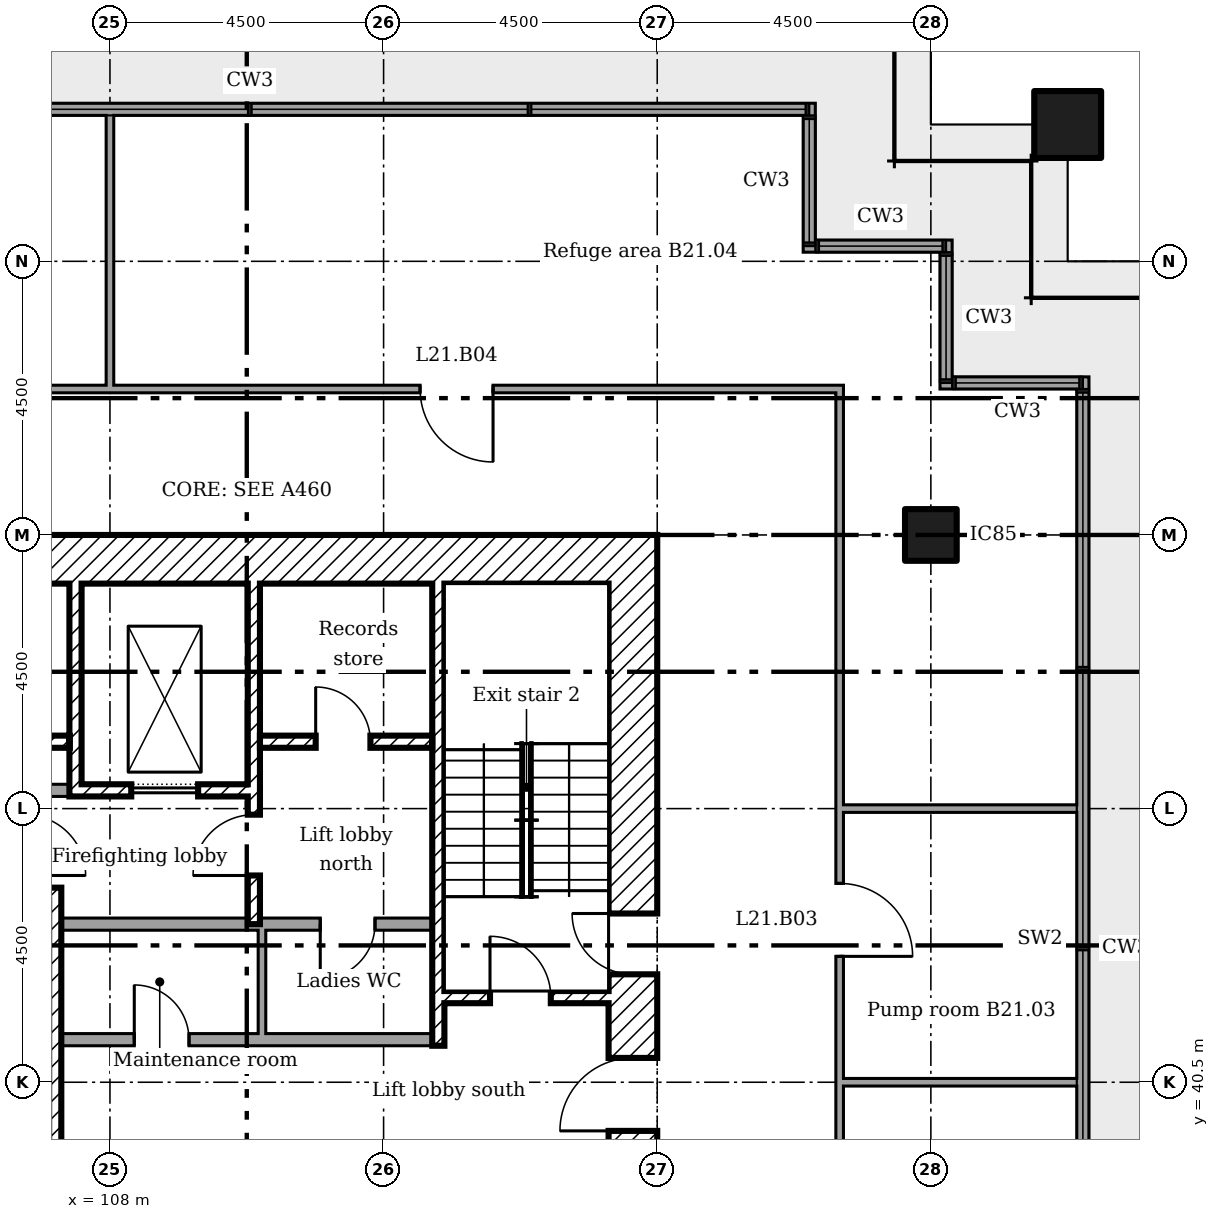
"""IFC4 building model, lengths in metres.
Left out: names, types, materials, properties, quantities, classifications, styles, units other than length and angle.
Written with IfcOpenShell. Run it as: python <this file> out.ifc"""

import sys

from ifc_helpers import new_model, si_unit, direction, frame, frame_2d, origin, origin_2d, place, context, subcontext, project, spatial, rectangle, extrude, element, fill, save


model = new_model("IFC4")
c1 = context("Model", 3, precision=1e-05, world=origin(), true_north=direction((0.0, 1.0)))
c2 = subcontext(c1, "Body", "Model", "MODEL_VIEW")
j1 = project(units=[si_unit("LENGTHUNIT", "METRE"), si_unit("PLANEANGLEUNIT", "RADIAN")], contexts=[c1])
p1 = place(None, origin())
s1 = spatial("IfcSite", under=j1, at=p1, CompositionType="ELEMENT")
p2 = place(p1, origin())
s2 = spatial("IfcBuilding", under=s1, at=p2, CompositionType="ELEMENT")
p3 = place(p2, frame((0.0, 0.0, 87.0)))
s3 = spatial("IfcBuildingStorey", under=s2, at=p3, CompositionType="ELEMENT", Elevation=87.0)
p4 = place(p3, frame((123.75, 56.25, 0.0)))
e1 = element("IfcColumn", 1, at=p4, inside=s3, PredefinedType="COLUMN", context=c2, shape_type="SweptSolid", body=[
    extrude(rectangle(XDim=1.1, YDim=1.1, at=origin_2d()), origin(), (0.0, 0.0, 1.0), 5.0),
])
p5 = place(p3, frame((121.5, 49.5, 0.0)))
e2 = element("IfcColumn", 2, at=p5, inside=s3, PredefinedType="COLUMN", context=c2, shape_type="SweptSolid", body=[
    extrude(rectangle(XDim=0.85, YDim=0.85, at=origin_2d()), origin(), (0.0, 0.0, 1.0), 5.0),
])
p6 = place(p3, frame((124.0, 33.6, 0.0), z_axis=(0.0, 0.0, 1.0), x_axis=(0.0, 1.0, 0.0)))
e3 = element("IfcWall", 3, at=p6, inside=s3, PredefinedType="ELEMENTEDWALL", context=c2, shape_type="SweptSolid", body=[
    extrude(rectangle(XDim=18.5, YDim=0.2, at=frame_2d((9.25, 0.0))), origin(), (0.0, 0.0, 1.0), 1.8),
])
for number, where, z_axis, x_axis in (
    (4, (123.9, 52.0, 0.0), (0.0, 0.0, 1.0), (-1.0, 0.0, 0.0)),
    (5, (121.75, 52.1, 0.0), (0.0, 0.0, 1.0), (0.0, 1.0, 0.0)),
    (6, (121.65, 54.25, 0.0), (0.0, 0.0, 1.0), (-1.0, 0.0, 0.0)),
    (7, (119.5, 54.35, 0.0), (0.0, 0.0, 1.0), (0.0, 1.0, 0.0)),
):
    element("IfcWall", number, at=place(p3, frame(where, z_axis=z_axis, x_axis=x_axis)), inside=s3, PredefinedType="ELEMENTEDWALL", context=c2, shape_type="SweptSolid", body=[
        extrude(rectangle(XDim=2.25, YDim=0.2, at=frame_2d((1.125, 0.0))), origin(), (0.0, 0.0, 1.0), 1.8),
    ])
p7 = place(p3, frame((119.4, 56.5, 0.0), z_axis=(0.0, 0.0, 1.0), x_axis=(-1.0, 0.0, 0.0)))
e8 = element("IfcWall", 8, at=p7, inside=s3, PredefinedType="ELEMENTEDWALL", context=c2, shape_type="SweptSolid", body=[
    extrude(rectangle(XDim=18.5, YDim=0.2, at=frame_2d((9.25, 0.0))), origin(), (0.0, 0.0, 1.0), 1.8),
])
p8 = place(p3, frame((116.6, 36.0, 0.0), z_axis=(0.0, 0.0, 1.0), x_axis=(0.0, 1.0, 0.0)))
e9 = element("IfcWall", 9, at=p8, inside=s3, PredefinedType="SHEAR", context=c2, shape_type="SweptSolid", body=[
    extrude(rectangle(XDim=13.5, YDim=0.8, at=frame_2d((6.75, 0.0))), origin(), (0.0, 0.0, 1.0), 4.75),
])
p9 = place(p8, frame((3.7, 0.0, 0.0)))
e10 = element("IfcOpeningElement", 10, at=p9, cuts=e9, PredefinedType="OPENING", context=c2, shape_type="SweptSolid", body=[
    extrude(rectangle(XDim=1.2, YDim=2.1, at=frame_2d((0.6, 1.05))), frame((0.0, 0.41, 0.0), z_axis=(0.0, -1.0, 0.0), x_axis=(1.0, 0.0, 0.0)), (0.0, 0.0, 1.0), 0.82),
])
p10 = place(p8, frame((6.275, 0.0, 0.0)))
e11 = element("IfcOpeningElement", 11, at=p10, cuts=e9, PredefinedType="OPENING", context=c2, shape_type="SweptSolid", body=[
    extrude(rectangle(XDim=1.0, YDim=2.1, at=frame_2d((0.5, 1.05))), frame((0.0, 0.41, 0.0), z_axis=(0.0, -1.0, 0.0), x_axis=(1.0, 0.0, 0.0)), (0.0, 0.0, 1.0), 0.82),
])
p11 = place(p3, frame((104.3, 49.1, 0.0)))
e12 = element("IfcWall", 12, at=p11, inside=s3, PredefinedType="SHEAR", context=c2, shape_type="SweptSolid", body=[
    extrude(rectangle(XDim=11.9, YDim=0.8, at=frame_2d((5.95, 0.0))), origin(), (0.0, 0.0, 1.0), 4.75),
])
p12 = place(p3, frame((107.433, 48.7, 0.0), z_axis=(0.0, 0.0, 1.0), x_axis=(0.0, -1.0, 0.0)))
e13 = element("IfcWall", 13, at=p12, inside=s3, PredefinedType="SHEAR", context=c2, shape_type="SweptSolid", body=[
    extrude(rectangle(XDim=3.5, YDim=0.2, at=frame_2d((1.75, 0.0))), origin(), (0.0, 0.0, 1.0), 4.75),
])
p13 = place(p3, frame((110.367, 48.7, 0.0), z_axis=(0.0, 0.0, 1.0), x_axis=(0.0, -1.0, 0.0)))
e14 = element("IfcWall", 14, at=p13, inside=s3, PredefinedType="SHEAR", context=c2, shape_type="SweptSolid", body=[
    extrude(rectangle(XDim=5.6, YDim=0.2, at=frame_2d((2.8, 0.0))), origin(), (0.0, 0.0, 1.0), 4.75),
])
p14 = place(p13, frame((3.8, 0.0, 0.0)))
e15 = element("IfcOpeningElement", 15, at=p14, cuts=e14, PredefinedType="OPENING", context=c2, shape_type="SweptSolid", body=[
    extrude(rectangle(XDim=1.0, YDim=2.1, at=frame_2d((0.5, 1.05))), frame((0.0, 0.11, 0.0), z_axis=(0.0, -1.0, 0.0), x_axis=(1.0, 0.0, 0.0)), (0.0, 0.0, 1.0), 0.22),
])
p15 = place(p3, frame((106.5, 45.3, 0.0)))
e16 = element("IfcWall", 16, at=p15, inside=s3, PredefinedType="PARTITIONING", context=c2, shape_type="SweptSolid", body=[
    extrude(rectangle(XDim=0.833, YDim=0.2, at=frame_2d((0.417, 0.0))), origin(), (0.0, 0.0, 1.0), 4.75),
])
p16 = place(p3, frame((104.3, 46.1, 0.0)))
e17 = element("IfcWall", 17, at=p16, inside=s3, PredefinedType="SHEAR", context=c2, shape_type="SweptSolid", body=[
    extrude(rectangle(XDim=3.033, YDim=0.2, at=frame_2d((1.517, 0.0))), origin(), (0.0, 0.0, 1.0), 4.75),
])
p17 = place(p16, frame((1.217, 0.0, 0.0)))
e18 = element("IfcOpeningElement", 18, at=p17, cuts=e17, PredefinedType="OPENING", context=c2, shape_type="SweptSolid", body=[
    extrude(rectangle(XDim=0.9, YDim=2.1, at=frame_2d((0.45, 1.05))), frame((0.0, 0.11, 0.0), z_axis=(0.0, -1.0, 0.0), x_axis=(1.0, 0.0, 0.0)), (0.0, 0.0, 1.0), 0.22),
])
p18 = place(p3, frame((110.467, 46.1, 0.0)))
e19 = element("IfcWall", 19, at=p18, inside=s3, PredefinedType="SHEAR", context=c2, shape_type="SweptSolid", body=[
    extrude(rectangle(XDim=2.833, YDim=0.2, at=frame_2d((1.417, 0.0))), origin(), (0.0, 0.0, 1.0), 4.75),
])
p19 = place(p18, frame((0.917, 0.0, 0.0)))
e20 = element("IfcOpeningElement", 20, at=p19, cuts=e19, PredefinedType="OPENING", context=c2, shape_type="SweptSolid", body=[
    extrude(rectangle(XDim=0.9, YDim=2.1, at=frame_2d((0.45, 1.05))), frame((0.0, 0.11, 0.0), z_axis=(0.0, -1.0, 0.0), x_axis=(1.0, 0.0, 0.0)), (0.0, 0.0, 1.0), 0.22),
])
p20 = place(p3, frame((107.533, 45.3, 0.0)))
e21 = element("IfcWall", 21, at=p20, inside=s3, PredefinedType="SHEAR", context=c2, shape_type="SweptSolid", body=[
    extrude(rectangle(XDim=2.733, YDim=0.2, at=frame_2d((1.367, 0.0))), origin(), (0.0, 0.0, 1.0), 4.75),
])
p21 = place(p20, frame((0.817, 0.0, 0.0)))
e22 = element("IfcOpeningElement", 22, at=p21, cuts=e21, PredefinedType="OPENING", context=c2, shape_type="SweptSolid", body=[
    extrude(rectangle(XDim=1.1, YDim=2.1, at=frame_2d((0.55, 1.05))), frame((0.0, 0.11, 0.0), z_axis=(0.0, -1.0, 0.0), x_axis=(1.0, 0.0, 0.0)), (0.0, 0.0, 1.0), 0.22),
])
p22 = place(p3, frame((107.1, 36.8, 0.0), z_axis=(0.0, 0.0, 1.0), x_axis=(0.0, 1.0, 0.0)))
e23 = element("IfcWall", 23, at=p22, inside=s3, PredefinedType="SHEAR", context=c2, shape_type="SweptSolid", body=[
    extrude(rectangle(XDim=6.9, YDim=0.2, at=frame_2d((3.45, 0.0))), origin(), (0.0, 0.0, 1.0), 4.75),
])
p23 = place(p3, frame((113.5, 41.9, 0.0)))
e24 = element("IfcWall", 24, at=p23, inside=s3, PredefinedType="SHEAR", context=c2, shape_type="SweptSolid", body=[
    extrude(rectangle(XDim=2.7, YDim=0.2, at=frame_2d((1.35, 0.0))), origin(), (0.0, 0.0, 1.0), 4.75),
])
p24 = place(p23, frame((0.75, 0.0, 0.0)))
e25 = element("IfcOpeningElement", 25, at=p24, cuts=e24, PredefinedType="OPENING", context=c2, shape_type="SweptSolid", body=[
    extrude(rectangle(XDim=1.0, YDim=2.1, at=frame_2d((0.5, 1.05))), frame((0.0, 0.11, 0.0), z_axis=(0.0, -1.0, 0.0), x_axis=(1.0, 0.0, 0.0)), (0.0, 0.0, 1.0), 0.22),
])
p25 = place(p3, frame((113.4, 41.1, 0.0), z_axis=(0.0, 0.0, 1.0), x_axis=(0.0, 1.0, 0.0)))
e26 = element("IfcWall", 26, at=p25, inside=s3, PredefinedType="SHEAR", context=c2, shape_type="SweptSolid", body=[
    extrude(rectangle(XDim=7.6, YDim=0.2, at=frame_2d((3.8, 0.0))), origin(), (0.0, 0.0, 1.0), 4.75),
])
p26 = place(p3, frame((107.2, 43.1, 0.0)))
e27 = element("IfcWall", 27, at=p26, inside=s3, PredefinedType="PARTITIONING", context=c2, shape_type="SweptSolid", body=[
    extrude(rectangle(XDim=6.1, YDim=0.2, at=frame_2d((3.05, 0.0))), origin(), (0.0, 0.0, 1.0), 4.75),
])
p27 = place(p26, frame((4.259, 0.0, 0.0)))
e28 = element("IfcOpeningElement", 28, at=p27, cuts=e27, PredefinedType="OPENING", context=c2, shape_type="SweptSolid", body=[
    extrude(rectangle(XDim=0.9, YDim=2.1, at=frame_2d((0.45, 1.05))), frame((0.0, 0.11, 0.0), z_axis=(0.0, -1.0, 0.0), x_axis=(1.0, 0.0, 0.0)), (0.0, 0.0, 1.0), 0.22),
])
p28 = place(p3, frame((107.2, 41.2, 0.0)))
e29 = element("IfcWall", 29, at=p28, inside=s3, PredefinedType="PARTITIONING", context=c2, shape_type="SweptSolid", body=[
    extrude(rectangle(XDim=6.1, YDim=0.2, at=frame_2d((3.05, 0.0))), origin(), (0.0, 0.0, 1.0), 4.75),
])
p29 = place(p28, frame((1.2, 0.0, 0.0)))
e30 = element("IfcOpeningElement", 30, at=p29, cuts=e29, PredefinedType="OPENING", context=c2, shape_type="SweptSolid", body=[
    extrude(rectangle(XDim=0.9, YDim=2.1, at=frame_2d((0.45, 1.05))), frame((0.0, 0.11, 0.0), z_axis=(0.0, -1.0, 0.0), x_axis=(1.0, 0.0, 0.0)), (0.0, 0.0, 1.0), 0.22),
])
p30 = place(p3, frame((110.5, 41.3, 0.0), z_axis=(0.0, 0.0, 1.0), x_axis=(0.0, 1.0, 0.0)))
e31 = element("IfcWall", 31, at=p30, inside=s3, PredefinedType="PARTITIONING", context=c2, shape_type="SweptSolid", body=[
    extrude(rectangle(XDim=1.7, YDim=0.125, at=frame_2d((0.85, 0.0))), origin(), (0.0, 0.0, 1.0), 4.75),
])
for number, where in (
    (32, (120.0, 40.5, 0.0)),
    (33, (120.0, 45.0, 0.0)),
):
    element("IfcWall", number, at=place(p3, frame(where)), inside=s3, PredefinedType="PARTITIONING", context=c2, shape_type="SweptSolid", body=[
        extrude(rectangle(XDim=3.9, YDim=0.125, at=frame_2d((1.95, 0.0))), origin(), (0.0, 0.0, 1.0), 4.251),
    ])
p31 = place(p3, frame((100.137, 51.9, 0.0)))
e34 = element("IfcWall", 34, at=p31, inside=s3, PredefinedType="PARTITIONING", context=c2, shape_type="SweptSolid", body=[
    extrude(rectangle(XDim=19.925, YDim=0.125, at=frame_2d((9.962, 0.0))), origin(), (0.0, 0.0, 1.0), 4.85),
])
p32 = place(p31, frame((12.962, 0.0, 0.0)))
e35 = element("IfcOpeningElement", 35, at=p32, cuts=e34, PredefinedType="OPENING", context=c2, shape_type="SweptSolid", body=[
    extrude(rectangle(XDim=1.2, YDim=2.1, at=frame_2d((0.6, 1.05))), frame((0.0, 0.073, 0.0), z_axis=(0.0, -1.0, 0.0), x_axis=(1.0, 0.0, 0.0)), (0.0, 0.0, 1.0), 0.145),
])
p33 = place(p31, frame((4.593, 0.0, 0.0)))
e36 = element("IfcOpeningElement", 36, at=p33, cuts=e34, PredefinedType="OPENING", context=c2, shape_type="SweptSolid", body=[
    extrude(rectangle(XDim=1.2, YDim=2.1, at=frame_2d((0.6, 1.05))), frame((0.0, 0.073, 0.0), z_axis=(0.0, -1.0, 0.0), x_axis=(1.0, 0.0, 0.0)), (0.0, 0.0, 1.0), 0.145),
])
p34 = place(p3, frame((108.0, 51.9, 0.0), z_axis=(0.0, 0.0, 1.0), x_axis=(0.0, 1.0, 0.0)))
e37 = element("IfcWall", 37, at=p34, inside=s3, PredefinedType="PARTITIONING", context=c2, shape_type="SweptSolid", body=[
    extrude(rectangle(XDim=4.5, YDim=0.125, at=frame_2d((2.25, 0.0))), origin(), (0.0, 0.0, 1.0), 4.162),
])
p35 = place(p3, frame((120.0, 33.962, 0.0), z_axis=(0.0, 0.0, 1.0), x_axis=(0.0, 1.0, 0.0)))
e38 = element("IfcWall", 38, at=p35, inside=s3, PredefinedType="PARTITIONING", context=c2, shape_type="SweptSolid", body=[
    extrude(rectangle(XDim=17.875, YDim=0.125, at=frame_2d((8.938, 0.0))), origin(), (0.0, 0.0, 1.0), 4.85),
])
p36 = place(p35, frame((8.607, 0.0, 0.0)))
e39 = element("IfcOpeningElement", 39, at=p36, cuts=e38, PredefinedType="OPENING", context=c2, shape_type="SweptSolid", body=[
    extrude(rectangle(XDim=1.2, YDim=2.1, at=frame_2d((0.6, 1.05))), frame((0.0, 0.073, 0.0), z_axis=(0.0, -1.0, 0.0), x_axis=(1.0, 0.0, 0.0)), (0.0, 0.0, 1.0), 0.145),
])
p37 = place(p9, origin())
e40 = element("IfcDoor", 40, at=p37, inside=s3, OperationType="SINGLE_SWING_RIGHT", PredefinedType="DOOR", context=c2, shape_type="SweptSolid", body=[
    extrude(rectangle(XDim=1.2, YDim=2.1, at=frame_2d((0.6, 1.05))), frame((0.0, 0.025, 0.0), z_axis=(0.0, -1.0, 0.0), x_axis=(1.0, 0.0, 0.0)), (0.0, 0.0, 1.0), 0.05),
])
fill(e10, e40)
p38 = place(p24, origin())
e41 = element("IfcDoor", 41, at=p38, inside=s3, OperationType="SINGLE_SWING_RIGHT", PredefinedType="DOOR", context=c2, shape_type="SweptSolid", body=[
    extrude(rectangle(XDim=1.0, YDim=2.1, at=frame_2d((0.5, 1.05))), frame((0.0, 0.025, 0.0), z_axis=(0.0, -1.0, 0.0), x_axis=(1.0, 0.0, 0.0)), (0.0, 0.0, 1.0), 0.05),
])
fill(e25, e41)
p39 = place(p10, origin())
e42 = element("IfcDoor", 42, at=p39, inside=s3, OperationType="SINGLE_SWING_LEFT", PredefinedType="DOOR", context=c2, shape_type="SweptSolid", body=[
    extrude(rectangle(XDim=1.0, YDim=2.1, at=frame_2d((0.5, 1.05))), frame((0.0, 0.025, 0.0), z_axis=(0.0, -1.0, 0.0), x_axis=(1.0, 0.0, 0.0)), (0.0, 0.0, 1.0), 0.05),
])
fill(e11, e42)
p40 = place(p14, frame((1.0, 0.0, 0.0), x_axis=(-1.0, 0.0, 0.0)))
e43 = element("IfcDoor", 43, at=p40, inside=s3, OperationType="SINGLE_SWING_RIGHT", PredefinedType="DOOR", context=c2, shape_type="SweptSolid", body=[
    extrude(rectangle(XDim=1.0, YDim=2.1, at=frame_2d((0.5, 1.05))), frame((0.0, 0.025, 0.0), z_axis=(0.0, -1.0, 0.0), x_axis=(1.0, 0.0, 0.0)), (0.0, 0.0, 1.0), 0.05),
])
fill(e15, e43)
p41 = place(p19, origin())
e44 = element("IfcDoor", 44, at=p41, inside=s3, OperationType="SINGLE_SWING_RIGHT", PredefinedType="DOOR", context=c2, shape_type="SweptSolid", body=[
    extrude(rectangle(XDim=0.9, YDim=2.1, at=frame_2d((0.45, 1.05))), frame((0.0, 0.025, 0.0), z_axis=(0.0, -1.0, 0.0), x_axis=(1.0, 0.0, 0.0)), (0.0, 0.0, 1.0), 0.05),
])
fill(e20, e44)
p42 = place(p29, origin())
e45 = element("IfcDoor", 45, at=p42, inside=s3, OperationType="SINGLE_SWING_RIGHT", PredefinedType="DOOR", context=c2, shape_type="SweptSolid", body=[
    extrude(rectangle(XDim=0.9, YDim=2.1, at=frame_2d((0.45, 1.05))), frame((0.0, 0.025, 0.0), z_axis=(0.0, -1.0, 0.0), x_axis=(1.0, 0.0, 0.0)), (0.0, 0.0, 1.0), 0.05),
])
fill(e30, e45)
p43 = place(p27, frame((0.9, 0.0, 0.0), x_axis=(-1.0, 0.0, 0.0)))
e46 = element("IfcDoor", 46, at=p43, inside=s3, OperationType="SINGLE_SWING_LEFT", PredefinedType="DOOR", context=c2, shape_type="SweptSolid", body=[
    extrude(rectangle(XDim=0.9, YDim=2.1, at=frame_2d((0.45, 1.05))), frame((0.0, 0.025, 0.0), z_axis=(0.0, -1.0, 0.0), x_axis=(1.0, 0.0, 0.0)), (0.0, 0.0, 1.0), 0.05),
])
fill(e28, e46)
p44 = place(p21, origin())
e47 = element("IfcDoor", 47, at=p44, inside=s3, OperationType="SLIDING_TO_LEFT", PredefinedType="DOOR", context=c2, shape_type="SweptSolid", body=[
    extrude(rectangle(XDim=1.1, YDim=2.1, at=frame_2d((0.55, 1.05))), frame((0.0, 0.025, 0.0), z_axis=(0.0, -1.0, 0.0), x_axis=(1.0, 0.0, 0.0)), (0.0, 0.0, 1.0), 0.05),
])
fill(e22, e47)
p45 = place(p36, frame((1.2, 0.0, 0.0), x_axis=(-1.0, 0.0, 0.0)))
e48 = element("IfcDoor", 48, at=p45, inside=s3, OperationType="SINGLE_SWING_LEFT", PredefinedType="DOOR", context=c2, shape_type="SweptSolid", body=[
    extrude(rectangle(XDim=1.2, YDim=2.1, at=frame_2d((0.6, 1.05))), frame((0.0, 0.025, 0.0), z_axis=(0.0, -1.0, 0.0), x_axis=(1.0, 0.0, 0.0)), (0.0, 0.0, 1.0), 0.05),
])
fill(e39, e48)
p46 = place(p32, frame((1.2, 0.0, 0.0), x_axis=(-1.0, 0.0, 0.0)))
e49 = element("IfcDoor", 49, at=p46, inside=s3, OperationType="SINGLE_SWING_RIGHT", PredefinedType="DOOR", context=c2, shape_type="SweptSolid", body=[
    extrude(rectangle(XDim=1.2, YDim=2.1, at=frame_2d((0.6, 1.05))), frame((0.0, 0.025, 0.0), z_axis=(0.0, -1.0, 0.0), x_axis=(1.0, 0.0, 0.0)), (0.0, 0.0, 1.0), 0.05),
])
fill(e35, e49)
save(model, sys.argv[1])
